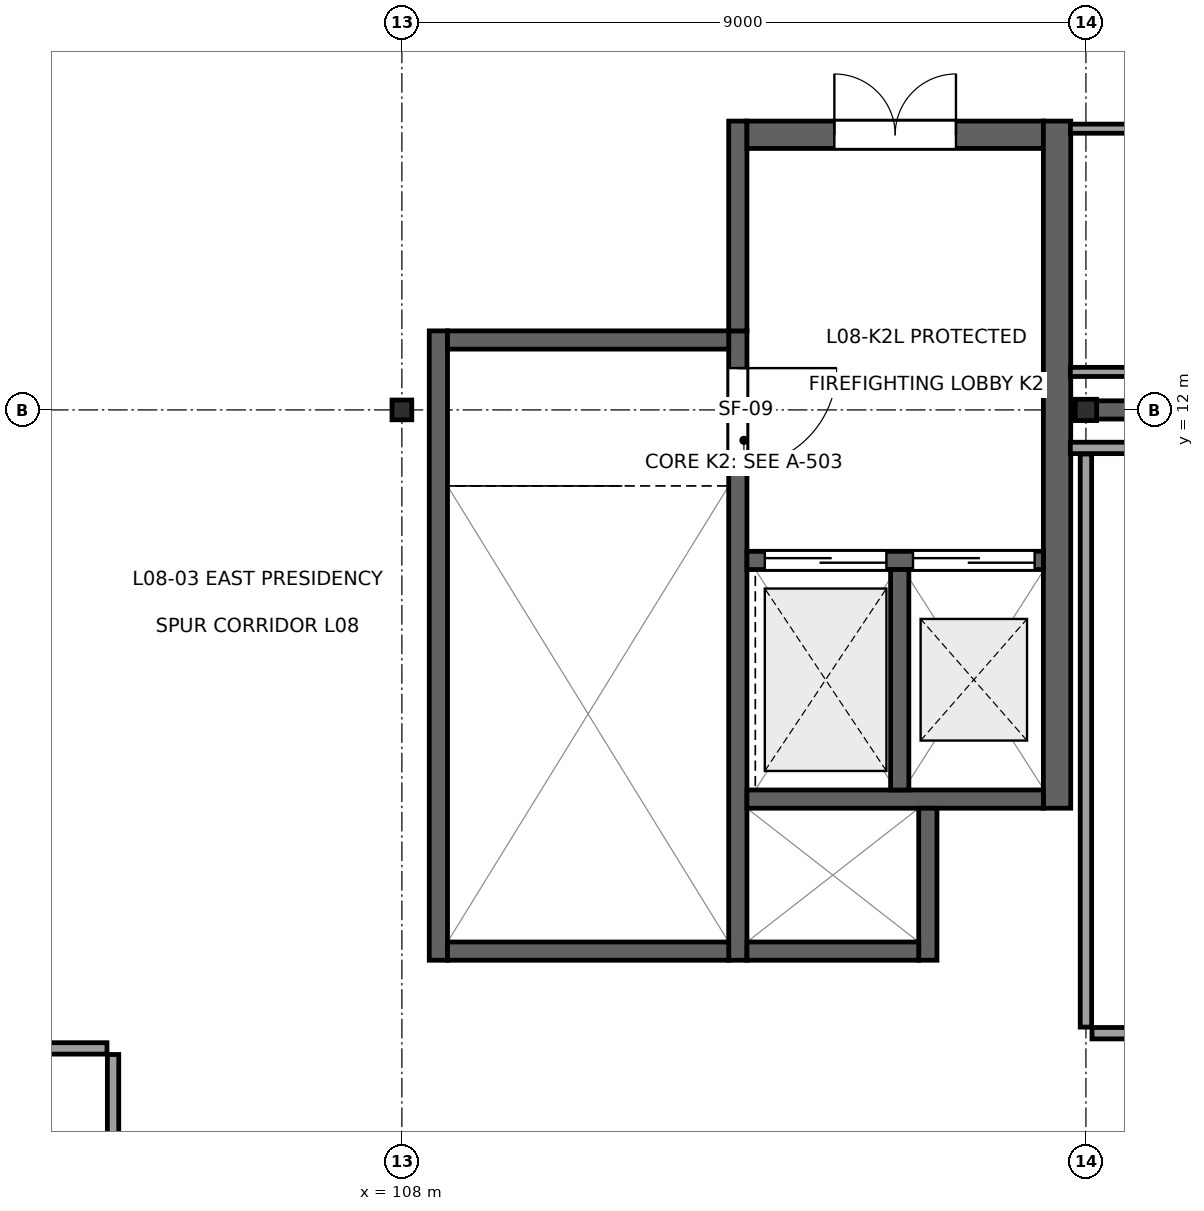
"""IFC4 building model, lengths in metres.
Left out: names, types, materials, properties, quantities, classifications, styles, units other than length and angle.
Written with IfcOpenShell. Run it as: python <this file> out.ifc"""

import sys

from ifc_helpers import new_model, si_unit, direction, frame, frame_2d, origin, origin_2d, place, context, subcontext, project, spatial, rectangle, i_section, extrude, element, fill, save


model = new_model("IFC4")
c1 = context("Model", 3, precision=1e-05, world=origin(), true_north=direction((0.0, 1.0)))
c2 = subcontext(c1, "Body", "Model", "MODEL_VIEW")
j1 = project(units=[si_unit("LENGTHUNIT", "METRE"), si_unit("PLANEANGLEUNIT", "RADIAN")], contexts=[c1])
p1 = place(None, origin())
s1 = spatial("IfcSite", under=j1, at=p1, CompositionType="ELEMENT")
p2 = place(p1, origin())
s2 = spatial("IfcBuilding", under=s1, at=p2, CompositionType="ELEMENT")
p3 = place(p2, frame((0.0, 0.0, 35.4)))
s3 = spatial("IfcBuildingStorey", under=s2, at=p3, CompositionType="ELEMENT", Elevation=35.4)
p4 = place(p3, frame((108.0, 12.0, 0.0), z_axis=(0.0, 0.0, 1.0), x_axis=(1.0, 0.0, 0.0)))
e1 = element("IfcColumn", 1, at=p4, inside=s3, PredefinedType="COLUMN", context=c2, shape_type="SweptSolid", body=[
    extrude(i_section(OverallWidth=0.26, OverallDepth=0.26, WebThickness=0.01, FlangeThickness=0.018, at=origin_2d()), origin(), (0.0, 0.0, 1.0), 3.8),
])
p5 = place(p3, frame((117.0, 12.0, 0.0), z_axis=(0.0, 0.0, 1.0), x_axis=(0.0, 1.0, 0.0)))
e2 = element("IfcColumn", 2, at=p5, inside=s3, PredefinedType="COLUMN", context=c2, shape_type="SweptSolid", body=[
    extrude(i_section(OverallWidth=0.28, OverallDepth=0.28, WebThickness=0.01, FlangeThickness=0.018, at=origin_2d()), origin(), (0.0, 0.0, 1.0), 3.8),
])
p6 = place(p3, frame((108.48, 4.76, 0.0), z_axis=(0.0, 0.0, 1.0), x_axis=(0.0, 1.0, 0.0)))
e3 = element("IfcWall", 3, at=p6, inside=s3, PredefinedType="SHEAR", context=c2, shape_type="SweptSolid", body=[
    extrude(rectangle(XDim=8.28, YDim=0.24, at=frame_2d((4.14, 0.0))), origin(), (0.0, 0.0, 1.0), 3.81),
])
p7 = place(p3, frame((112.42, 4.76, 0.0), z_axis=(0.0, 0.0, 1.0), x_axis=(0.0, 1.0, 0.0)))
e4 = element("IfcWall", 4, at=p7, inside=s3, PredefinedType="SHEAR", context=c2, shape_type="SweptSolid", body=[
    extrude(rectangle(XDim=8.28, YDim=0.24, at=frame_2d((4.14, 0.0))), origin(), (0.0, 0.0, 1.0), 3.81),
])
p8 = place(p7, frame((6.49, 0.0, 0.0)))
e5 = element("IfcOpeningElement", 5, at=p8, cuts=e4, PredefinedType="OPENING", context=c2, shape_type="SweptSolid", body=[
    extrude(rectangle(XDim=1.3, YDim=2.2, at=frame_2d((0.65, 1.1))), frame((0.0, 0.135, 0.0), z_axis=(0.0, -1.0, 0.0), x_axis=(1.0, 0.0, 0.0)), (0.0, 0.0, 1.0), 0.27),
])
for number, where, z_axis, x_axis in (
    (6, (108.6, 4.88, 0.0), (0.0, 0.0, 1.0), (1.0, 0.0, 0.0)),
    (7, (108.6, 12.92, 0.0), (0.0, 0.0, 1.0), (1.0, 0.0, 0.0)),
):
    element("IfcWall", number, at=place(p3, frame(where, z_axis=z_axis, x_axis=x_axis)), inside=s3, PredefinedType="SHEAR", context=c2, shape_type="SweptSolid", body=[
        extrude(rectangle(XDim=3.7, YDim=0.24, at=frame_2d((1.85, 0.0))), origin(), (0.0, 0.0, 1.0), 3.81),
    ])
p9 = place(p3, frame((112.42, 13.04, 0.0), z_axis=(0.0, 0.0, 1.0), x_axis=(0.0, 1.0, 0.0)))
e8 = element("IfcWall", 8, at=p9, inside=s3, PredefinedType="SHEAR", context=c2, shape_type="SweptSolid", body=[
    extrude(rectangle(XDim=2.76, YDim=0.24, at=frame_2d((1.38, 0.0))), origin(), (0.0, 0.0, 1.0), 3.66),
])
p10 = place(p3, frame((112.54, 15.62, 0.0), z_axis=(0.0, 0.0, 1.0), x_axis=(1.0, 0.0, 0.0)))
e9 = element("IfcWall", 9, at=p10, inside=s3, PredefinedType="SHEAR", context=c2, shape_type="SweptSolid", body=[
    extrude(rectangle(XDim=3.9, YDim=0.36, at=frame_2d((1.95, 0.0))), origin(), (0.0, 0.0, 1.0), 3.66),
])
p11 = place(p10, frame((1.15, 0.0, 0.0)))
e10 = element("IfcOpeningElement", 10, at=p11, cuts=e9, PredefinedType="OPENING", context=c2, shape_type="SweptSolid", body=[
    extrude(rectangle(XDim=1.6, YDim=2.25, at=frame_2d((0.8, 1.125))), frame((0.0, 0.195, 0.0), z_axis=(0.0, -1.0, 0.0), x_axis=(1.0, 0.0, 0.0)), (0.0, 0.0, 1.0), 0.39),
])
p12 = place(p3, frame((116.62, 6.76, 0.0), z_axis=(0.0, 0.0, 1.0), x_axis=(0.0, 1.0, 0.0)))
e11 = element("IfcWall", 11, at=p12, inside=s3, PredefinedType="SHEAR", context=c2, shape_type="SweptSolid", body=[
    extrude(rectangle(XDim=9.04, YDim=0.36, at=frame_2d((4.52, 0.0))), origin(), (0.0, 0.0, 1.0), 3.66),
])
p13 = place(p3, frame((112.54, 10.02, 0.0), z_axis=(0.0, 0.0, 1.0), x_axis=(1.0, 0.0, 0.0)))
e12 = element("IfcWall", 12, at=p13, inside=s3, PredefinedType="SHEAR", context=c2, shape_type="SweptSolid", body=[
    extrude(rectangle(XDim=3.9, YDim=0.24, at=frame_2d((1.95, 0.0))), origin(), (0.0, 0.0, 1.0), 3.81),
])
p14 = place(p13, frame((0.235, 0.0, 0.0)))
e13 = element("IfcOpeningElement", 13, at=p14, cuts=e12, PredefinedType="OPENING", context=c2, shape_type="SweptSolid", body=[
    extrude(rectangle(XDim=1.6, YDim=2.3, at=frame_2d((0.8, 1.15))), frame((0.0, 0.135, 0.0), z_axis=(0.0, -1.0, 0.0), x_axis=(1.0, 0.0, 0.0)), (0.0, 0.0, 1.0), 0.27),
])
p15 = place(p13, frame((2.185, 0.0, 0.0)))
e14 = element("IfcOpeningElement", 14, at=p15, cuts=e12, PredefinedType="OPENING", context=c2, shape_type="SweptSolid", body=[
    extrude(rectangle(XDim=1.6, YDim=2.3, at=frame_2d((0.8, 1.15))), frame((0.0, 0.135, 0.0), z_axis=(0.0, -1.0, 0.0), x_axis=(1.0, 0.0, 0.0)), (0.0, 0.0, 1.0), 0.27),
])
p16 = place(p3, frame((112.54, 6.88, 0.0), z_axis=(0.0, 0.0, 1.0), x_axis=(1.0, 0.0, 0.0)))
e15 = element("IfcWall", 15, at=p16, inside=s3, PredefinedType="SHEAR", context=c2, shape_type="SweptSolid", body=[
    extrude(rectangle(XDim=3.9, YDim=0.24, at=frame_2d((1.95, 0.0))), origin(), (0.0, 0.0, 1.0), 3.81),
])
p17 = place(p3, frame((114.55, 7.0, 0.0), z_axis=(0.0, 0.0, 1.0), x_axis=(0.0, 1.0, 0.0)))
e16 = element("IfcWall", 16, at=p17, inside=s3, PredefinedType="SHEAR", context=c2, shape_type="SweptSolid", body=[
    extrude(rectangle(XDim=2.9, YDim=0.24, at=frame_2d((1.45, 0.0))), origin(), (0.0, 0.0, 1.0), 3.81),
])
p18 = place(p3, frame((114.92, 4.76, 0.0), z_axis=(0.0, 0.0, 1.0), x_axis=(0.0, 1.0, 0.0)))
e17 = element("IfcWall", 17, at=p18, inside=s3, PredefinedType="SHEAR", context=c2, shape_type="SweptSolid", body=[
    extrude(rectangle(XDim=2.0, YDim=0.24, at=frame_2d((1.0, 0.0))), origin(), (0.0, 0.0, 1.0), 3.81),
])
p19 = place(p3, frame((112.54, 4.88, 0.0), z_axis=(0.0, 0.0, 1.0), x_axis=(1.0, 0.0, 0.0)))
e18 = element("IfcWall", 18, at=p19, inside=s3, PredefinedType="SHEAR", context=c2, shape_type="SweptSolid", body=[
    extrude(rectangle(XDim=2.26, YDim=0.24, at=frame_2d((1.13, 0.0))), origin(), (0.0, 0.0, 1.0), 3.81),
])
p20 = place(p3, frame((117.138, 12.0, 0.0), z_axis=(0.0, 0.0, 1.0), x_axis=(1.0, 0.0, 0.0)))
e19 = element("IfcWall", 19, at=p20, inside=s3, PredefinedType="SHEAR", context=c2, shape_type="SweptSolid", body=[
    extrude(rectangle(XDim=8.854, YDim=0.24, at=frame_2d((4.427, 0.0))), origin(), (0.0, 0.0, 1.0), 3.255),
])
p21 = place(p3, frame((45.88, 3.6, 0.0), z_axis=(0.0, 0.0, 1.0), x_axis=(1.0, 0.0, 0.0)))
e20 = element("IfcWall", 20, at=p21, inside=s3, PredefinedType="PARTITIONING", context=c2, shape_type="SweptSolid", body=[
    extrude(rectangle(XDim=58.24, YDim=0.15, at=frame_2d((29.12, 0.0))), origin(), (0.0, 0.0, 1.0), 3.64),
])
p22 = place(p21, frame((27.795, 0.0, 0.0)))
e21 = element("IfcOpeningElement", 21, at=p22, cuts=e20, PredefinedType="OPENING", context=c2, shape_type="SweptSolid", body=[
    extrude(rectangle(XDim=1.05, YDim=2.25, at=frame_2d((0.525, 1.125))), frame((0.0, 0.09, 0.0), z_axis=(0.0, -1.0, 0.0), x_axis=(1.0, 0.0, 0.0)), (0.0, 0.0, 1.0), 0.18),
])
p23 = place(p3, frame((104.2, 3.52, 0.0), z_axis=(0.0, 0.0, 1.0), x_axis=(0.0, -1.0, 0.0)))
e22 = element("IfcWall", 22, at=p23, inside=s3, PredefinedType="PARTITIONING", context=c2, shape_type="SweptSolid", body=[
    extrude(rectangle(XDim=3.285, YDim=0.15, at=frame_2d((1.643, 0.0))), origin(), (0.0, 0.0, 1.0), 3.64),
])
p24 = place(p3, frame((117.0, 3.88, 0.0), z_axis=(0.0, 0.0, 1.0), x_axis=(0.0, 1.0, 0.0)))
e23 = element("IfcWall", 23, at=p24, inside=s3, PredefinedType="PARTITIONING", context=c2, shape_type="SweptSolid", body=[
    extrude(rectangle(XDim=7.54, YDim=0.15, at=frame_2d((3.77, 0.0))), origin(), (0.0, 0.0, 1.0), 3.245),
])
p25 = place(p3, frame((116.795, 11.5, 0.0), z_axis=(0.0, 0.0, 1.0), x_axis=(1.0, 0.0, 0.0)))
e24 = element("IfcWall", 24, at=p25, inside=s3, PredefinedType="PARTITIONING", context=c2, shape_type="SweptSolid", body=[
    extrude(rectangle(XDim=8.97, YDim=0.15, at=frame_2d((4.485, 0.0))), origin(), (0.0, 0.0, 1.0), 3.64),
])
p26 = place(p3, frame((125.765, 3.8, 0.0), z_axis=(0.0, 0.0, 1.0), x_axis=(-1.0, 0.0, 0.0)))
e25 = element("IfcWall", 25, at=p26, inside=s3, PredefinedType="PARTITIONING", context=c2, shape_type="SweptSolid", body=[
    extrude(rectangle(XDim=8.685, YDim=0.15, at=frame_2d((4.342, 0.0))), origin(), (0.0, 0.0, 1.0), 3.64),
])
p27 = place(p26, frame((3.818, 0.0, 0.0)))
e26 = element("IfcOpeningElement", 26, at=p27, cuts=e25, PredefinedType="OPENING", context=c2, shape_type="SweptSolid", body=[
    extrude(rectangle(XDim=1.05, YDim=2.25, at=frame_2d((0.525, 1.125))), frame((0.0, 0.09, 0.0), z_axis=(0.0, -1.0, 0.0), x_axis=(1.0, 0.0, 0.0)), (0.0, 0.0, 1.0), 0.18),
])
p28 = place(p3, frame((125.865, 12.5, 0.0), z_axis=(0.0, 0.0, 1.0), x_axis=(-1.0, 0.0, 0.0)))
e27 = element("IfcWall", 27, at=p28, inside=s3, PredefinedType="PARTITIONING", context=c2, shape_type="SweptSolid", body=[
    extrude(rectangle(XDim=9.07, YDim=0.12, at=frame_2d((4.535, 0.0))), origin(), (0.0, 0.0, 1.0), 3.64),
])
p29 = place(p3, frame((116.795, 15.7, 0.0), z_axis=(0.0, 0.0, 1.0), x_axis=(1.0, 0.0, 0.0)))
e28 = element("IfcWall", 28, at=p29, inside=s3, PredefinedType="PARTITIONING", context=c2, shape_type="SweptSolid", body=[
    extrude(rectangle(XDim=9.07, YDim=0.12, at=frame_2d((4.535, 0.0))), origin(), (0.0, 0.0, 1.0), 3.64),
])
p30 = place(p29, frame((4.06, 0.0, 0.0)))
e29 = element("IfcOpeningElement", 29, at=p30, cuts=e28, PredefinedType="OPENING", context=c2, shape_type="SweptSolid", body=[
    extrude(rectangle(XDim=0.95, YDim=2.15, at=frame_2d((0.475, 1.075))), frame((0.0, 0.075, 0.0), z_axis=(0.0, -1.0, 0.0), x_axis=(1.0, 0.0, 0.0)), (0.0, 0.0, 1.0), 0.15),
])
p31 = place(p8, frame((1.3, 0.0, 0.0), z_axis=(0.0, 0.0, 1.0), x_axis=(-1.0, 0.0, 0.0)))
e30 = element("IfcDoor", 30, at=p31, inside=s3, OperationType="SINGLE_SWING_RIGHT", PredefinedType="DOOR", context=c2, shape_type="SweptSolid", body=[
    extrude(rectangle(XDim=1.3, YDim=2.2, at=frame_2d((0.65, 1.1))), frame((0.0, 0.025, 0.0), z_axis=(0.0, -1.0, 0.0), x_axis=(1.0, 0.0, 0.0)), (0.0, 0.0, 1.0), 0.05),
])
fill(e5, e30)
p32 = place(p11, origin())
e31 = element("IfcDoor", 31, at=p32, inside=s3, OperationType="DOUBLE_DOOR_SINGLE_SWING", PredefinedType="DOOR", context=c2, shape_type="SweptSolid", body=[
    extrude(rectangle(XDim=1.6, YDim=2.25, at=frame_2d((0.8, 1.125))), frame((0.0, 0.025, 0.0), z_axis=(0.0, -1.0, 0.0), x_axis=(1.0, 0.0, 0.0)), (0.0, 0.0, 1.0), 0.05),
])
fill(e10, e31)
p33 = place(p14, origin())
e32 = element("IfcDoor", 32, at=p33, inside=s3, OperationType="DOUBLE_DOOR_SLIDING", PredefinedType="DOOR", context=c2, shape_type="SweptSolid", body=[
    extrude(rectangle(XDim=1.6, YDim=2.3, at=frame_2d((0.8, 1.15))), frame((0.0, 0.025, 0.0), z_axis=(0.0, -1.0, 0.0), x_axis=(1.0, 0.0, 0.0)), (0.0, 0.0, 1.0), 0.05),
])
fill(e13, e32)
p34 = place(p15, origin())
e33 = element("IfcDoor", 33, at=p34, inside=s3, OperationType="DOUBLE_DOOR_SLIDING", PredefinedType="DOOR", context=c2, shape_type="SweptSolid", body=[
    extrude(rectangle(XDim=1.6, YDim=2.3, at=frame_2d((0.8, 1.15))), frame((0.0, 0.025, 0.0), z_axis=(0.0, -1.0, 0.0), x_axis=(1.0, 0.0, 0.0)), (0.0, 0.0, 1.0), 0.05),
])
fill(e14, e33)
save(model, sys.argv[1])
